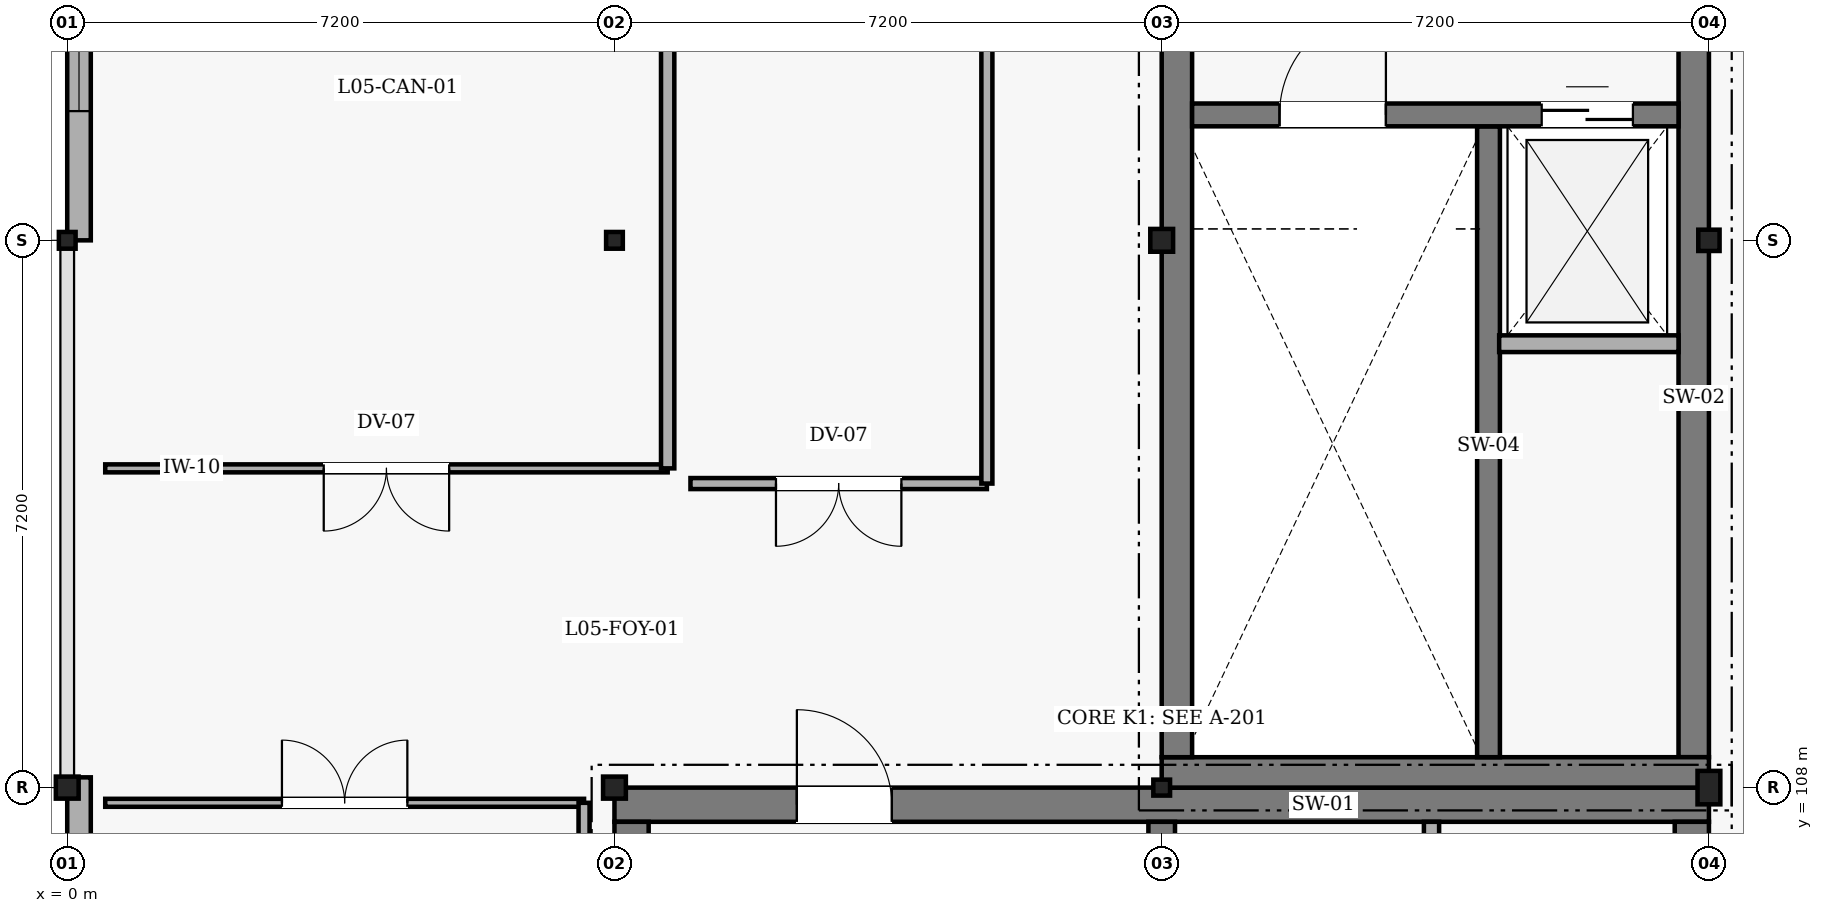
"""IFC4 building model, lengths in metres.
Left out: names, types, materials, properties, quantities, classifications, styles, units other than length and angle.
Written with IfcOpenShell. Run it as: python <this file> out.ifc"""

import sys

from ifc_helpers import new_model, si_unit, direction, frame, frame_2d, origin, origin_2d, place, context, subcontext, project, spatial, rectangle, i_section, extrude, element, fill, save


model = new_model("IFC4")
c1 = context("Model", 3, precision=1e-05, world=origin(), true_north=direction((0.0, 1.0)))
c2 = subcontext(c1, "Body", "Model", "MODEL_VIEW")
j1 = project(units=[si_unit("LENGTHUNIT", "METRE"), si_unit("PLANEANGLEUNIT", "RADIAN")], contexts=[c1])
p1 = place(None, origin())
s1 = spatial("IfcSite", under=j1, at=p1, CompositionType="ELEMENT")
p2 = place(p1, origin())
s2 = spatial("IfcBuilding", under=s1, at=p2, CompositionType="ELEMENT")
p3 = place(p2, frame((0.0, 0.0, 21.6)))
s3 = spatial("IfcBuildingStorey", under=s2, at=p3, CompositionType="ELEMENT", Elevation=21.6)
p4 = place(p3, frame((7.2, 107.775, 0.0), z_axis=(0.0, 0.0, 1.0), x_axis=(1.0, 0.0, 0.0)))
e1 = element("IfcWall", 1, at=p4, inside=s3, PredefinedType="SHEAR", context=c2, shape_type="SweptSolid", body=[
    extrude(rectangle(XDim=14.4, YDim=0.45, at=frame_2d((7.2, 0.0))), origin(), (0.0, 0.0, 1.0), 3.62),
])
p5 = place(p4, frame((2.4, 0.0, 0.0)))
e2 = element("IfcOpeningElement", 2, at=p5, cuts=e1, PredefinedType="OPENING", context=c2, shape_type="SweptSolid", body=[
    extrude(rectangle(XDim=1.25, YDim=2.2, at=frame_2d((0.625, 1.1))), frame((0.0, 0.235, 0.0), z_axis=(0.0, -1.0, 0.0), x_axis=(1.0, 0.0, 0.0)), (0.0, 0.0, 1.0), 0.47),
])
p6 = place(p3, frame((21.375, 107.55, 0.0), z_axis=(0.0, 0.0, 1.0), x_axis=(0.0, -1.0, 0.0)))
e3 = element("IfcWall", 3, at=p6, inside=s3, PredefinedType="SHEAR", context=c2, shape_type="SweptSolid", body=[
    extrude(rectangle(XDim=13.5, YDim=0.45, at=frame_2d((6.75, 0.0))), origin(), (0.0, 0.0, 1.0), 3.62),
])
p7 = place(p6, frame((9.8, 0.0, 0.0)))
e4 = element("IfcOpeningElement", 4, at=p7, cuts=e3, PredefinedType="OPENING", context=c2, shape_type="SweptSolid", body=[
    extrude(rectangle(XDim=1.0, YDim=2.15, at=frame_2d((0.5, 1.075))), frame((0.0, 0.235, 0.0), z_axis=(0.0, -1.0, 0.0), x_axis=(1.0, 0.0, 0.0)), (0.0, 0.0, 1.0), 0.47),
])
p8 = place(p6, frame((2.3, 0.0, 0.0)))
e5 = element("IfcOpeningElement", 5, at=p8, cuts=e3, PredefinedType="OPENING", context=c2, shape_type="SweptSolid", body=[
    extrude(rectangle(XDim=1.25, YDim=2.2, at=frame_2d((0.625, 1.1))), frame((0.0, 0.235, 0.0), z_axis=(0.0, -1.0, 0.0), x_axis=(1.0, 0.0, 0.0)), (0.0, 0.0, 1.0), 0.47),
])
p9 = place(p3, frame((7.425, 94.05, 0.0), z_axis=(0.0, 0.0, 1.0), x_axis=(0.0, 1.0, 0.0)))
e6 = element("IfcWall", 6, at=p9, inside=s3, PredefinedType="SHEAR", context=c2, shape_type="SweptSolid", body=[
    extrude(rectangle(XDim=13.5, YDim=0.45, at=frame_2d((6.75, 0.0))), origin(), (0.0, 0.0, 1.0), 3.62),
])
p10 = place(p3, frame((14.4, 107.55, 0.0), z_axis=(0.0, 0.0, 1.0), x_axis=(0.0, -1.0, 0.0)))
e7 = element("IfcWall", 7, at=p10, inside=s3, PredefinedType="SHEAR", context=c2, shape_type="SweptSolid", body=[
    extrude(rectangle(XDim=13.5, YDim=0.35, at=frame_2d((6.75, 0.0))), origin(), (0.0, 0.0, 1.0), 3.62),
])
p11 = place(p10, frame((1.4, 0.0, 0.0)))
e8 = element("IfcOpeningElement", 8, at=p11, cuts=e7, PredefinedType="OPENING", context=c2, shape_type="SweptSolid", body=[
    extrude(rectangle(XDim=1.25, YDim=2.2, at=frame_2d((0.625, 1.1))), frame((0.0, 0.185, 0.0), z_axis=(0.0, -1.0, 0.0), x_axis=(1.0, 0.0, 0.0)), (0.0, 0.0, 1.0), 0.37),
])
p12 = place(p3, frame((21.4, 122.0, 0.0), z_axis=(0.0, 0.0, 1.0), x_axis=(0.0, -1.0, 0.0)))
e9 = element("IfcWall", 9, at=p12, inside=s3, PredefinedType="SHEAR", context=c2, shape_type="SweptSolid", body=[
    extrude(rectangle(XDim=13.6, YDim=0.4, at=frame_2d((6.8, 0.0))), origin(), (0.0, 0.0, 1.0), 3.62),
])
p13 = place(p12, frame((2.3, 0.0, 0.0)))
e10 = element("IfcOpeningElement", 10, at=p13, cuts=e9, PredefinedType="OPENING", context=c2, shape_type="SweptSolid", body=[
    extrude(rectangle(XDim=1.25, YDim=2.2, at=frame_2d((0.625, 1.1))), frame((0.0, 0.21, 0.0), z_axis=(0.0, -1.0, 0.0), x_axis=(1.0, 0.0, 0.0)), (0.0, 0.0, 1.0), 0.42),
])
p14 = place(p3, frame((21.6, 108.2, 0.0), z_axis=(0.0, 0.0, 1.0), x_axis=(-1.0, 0.0, 0.0)))
e11 = element("IfcWall", 11, at=p14, inside=s3, PredefinedType="SHEAR", context=c2, shape_type="SweptSolid", body=[
    extrude(rectangle(XDim=7.2, YDim=0.4, at=frame_2d((3.6, 0.0))), origin(), (0.0, 0.0, 1.0), 3.62),
])
p15 = place(p3, frame((14.6, 108.4, 0.0), z_axis=(0.0, 0.0, 1.0), x_axis=(0.0, 1.0, 0.0)))
e12 = element("IfcWall", 12, at=p15, inside=s3, PredefinedType="SHEAR", context=c2, shape_type="SweptSolid", body=[
    extrude(rectangle(XDim=13.6, YDim=0.4, at=frame_2d((6.8, 0.0))), origin(), (0.0, 0.0, 1.0), 3.62),
])
p16 = place(p15, frame((9.8, 0.0, 0.0)))
e13 = element("IfcOpeningElement", 13, at=p16, cuts=e12, PredefinedType="OPENING", context=c2, shape_type="SweptSolid", body=[
    extrude(rectangle(XDim=1.25, YDim=2.2, at=frame_2d((0.625, 1.1))), frame((0.0, 0.21, 0.0), z_axis=(0.0, -1.0, 0.0), x_axis=(1.0, 0.0, 0.0)), (0.0, 0.0, 1.0), 0.42),
])
p17 = place(p3, frame((18.7, 116.7, 0.0), z_axis=(0.0, 0.0, 1.0), x_axis=(0.0, -1.0, 0.0)))
e14 = element("IfcWall", 14, at=p17, inside=s3, PredefinedType="SHEAR", context=c2, shape_type="SweptSolid", body=[
    extrude(rectangle(XDim=8.3, YDim=0.3, at=frame_2d((4.15, 0.0))), origin(), (0.0, 0.0, 1.0), 3.62),
])
p18 = place(p3, frame((14.8, 116.85, 0.0), z_axis=(0.0, 0.0, 1.0), x_axis=(1.0, 0.0, 0.0)))
e15 = element("IfcWall", 15, at=p18, inside=s3, PredefinedType="SHEAR", context=c2, shape_type="SweptSolid", body=[
    extrude(rectangle(XDim=6.4, YDim=0.3, at=frame_2d((3.2, 0.0))), origin(), (0.0, 0.0, 1.0), 3.62),
])
p19 = place(p18, frame((1.15, 0.0, 0.0)))
e16 = element("IfcOpeningElement", 16, at=p19, cuts=e15, PredefinedType="OPENING", context=c2, shape_type="SweptSolid", body=[
    extrude(rectangle(XDim=1.4, YDim=2.2, at=frame_2d((0.7, 1.1))), frame((0.0, 0.16, 0.0), z_axis=(0.0, -1.0, 0.0), x_axis=(1.0, 0.0, 0.0)), (0.0, 0.0, 1.0), 0.32),
])
p20 = place(p18, frame((4.6, 0.0, 0.0)))
e17 = element("IfcOpeningElement", 17, at=p20, cuts=e15, PredefinedType="OPENING", context=c2, shape_type="SweptSolid", body=[
    extrude(rectangle(XDim=1.2, YDim=2.15, at=frame_2d((0.6, 1.075))), frame((0.0, 0.16, 0.0), z_axis=(0.0, -1.0, 0.0), x_axis=(1.0, 0.0, 0.0)), (0.0, 0.0, 1.0), 0.32),
])
p21 = place(p3, frame((0.0, 108.0, 0.0), z_axis=(0.0, 0.0, 1.0), x_axis=(1.0, 0.0, 0.0)))
e18 = element("IfcColumn", 18, at=p21, inside=s3, PredefinedType="COLUMN", context=c2, shape_type="SweptSolid", body=[
    extrude(i_section(OverallWidth=0.3, OverallDepth=0.29, WebThickness=0.009, FlangeThickness=0.014, FilletRadius=0.027, at=origin_2d()), origin(), (0.0, 0.0, 1.0), 3.62),
])
p22 = place(p3, frame((0.0, 115.2, 0.0), z_axis=(0.0, 0.0, 1.0), x_axis=(1.0, 0.0, 0.0)))
e19 = element("IfcColumn", 19, at=p22, inside=s3, PredefinedType="COLUMN", context=c2, shape_type="SweptSolid", body=[
    extrude(i_section(OverallWidth=0.22, OverallDepth=0.22, WebThickness=0.01, FlangeThickness=0.016, FilletRadius=0.018, at=origin_2d()), origin(), (0.0, 0.0, 1.0), 3.62),
])
p23 = place(p3, frame((7.2, 108.0, 0.0), z_axis=(0.0, 0.0, 1.0), x_axis=(1.0, 0.0, 0.0)))
e20 = element("IfcColumn", 20, at=p23, inside=s3, PredefinedType="COLUMN", context=c2, shape_type="SweptSolid", body=[
    extrude(i_section(OverallWidth=0.3, OverallDepth=0.29, WebThickness=0.009, FlangeThickness=0.014, FilletRadius=0.027, at=origin_2d()), origin(), (0.0, 0.0, 1.0), 3.62),
])
p24 = place(p3, frame((7.2, 115.2, 0.0), z_axis=(0.0, 0.0, 1.0), x_axis=(1.0, 0.0, 0.0)))
e21 = element("IfcColumn", 21, at=p24, inside=s3, PredefinedType="COLUMN", context=c2, shape_type="SweptSolid", body=[
    extrude(i_section(OverallWidth=0.22, OverallDepth=0.22, WebThickness=0.01, FlangeThickness=0.016, FilletRadius=0.018, at=origin_2d()), origin(), (0.0, 0.0, 1.0), 3.62),
])
p25 = place(p3, frame((14.4, 108.0, 0.0), z_axis=(0.0, 0.0, 1.0), x_axis=(1.0, 0.0, 0.0)))
e22 = element("IfcColumn", 22, at=p25, inside=s3, PredefinedType="COLUMN", context=c2, shape_type="SweptSolid", body=[
    extrude(i_section(OverallWidth=0.22, OverallDepth=0.21, WebThickness=0.007, FlangeThickness=0.011, FilletRadius=0.018, at=origin_2d()), origin(), (0.0, 0.0, 1.0), 3.62),
])
p26 = place(p3, frame((14.4, 115.2, 0.0), z_axis=(0.0, 0.0, 1.0), x_axis=(1.0, 0.0, 0.0)))
e23 = element("IfcColumn", 23, at=p26, inside=s3, PredefinedType="COLUMN", context=c2, shape_type="SweptSolid", body=[
    extrude(i_section(OverallWidth=0.3, OverallDepth=0.3, WebThickness=0.011, FlangeThickness=0.019, FilletRadius=0.027, at=origin_2d()), origin(), (0.0, 0.0, 1.0), 3.62),
])
p27 = place(p3, frame((21.6, 108.0, 0.0), z_axis=(0.0, 0.0, 1.0), x_axis=(1.0, 0.0, 0.0)))
e24 = element("IfcColumn", 24, at=p27, inside=s3, PredefinedType="COLUMN", context=c2, shape_type="SweptSolid", body=[
    extrude(i_section(OverallWidth=0.3, OverallDepth=0.44, WebThickness=0.011, FlangeThickness=0.021, FilletRadius=0.027, at=origin_2d()), origin(), (0.0, 0.0, 1.0), 3.62),
])
p28 = place(p3, frame((21.6, 115.2, 0.0), z_axis=(0.0, 0.0, 1.0), x_axis=(1.0, 0.0, 0.0)))
e25 = element("IfcColumn", 25, at=p28, inside=s3, PredefinedType="COLUMN", context=c2, shape_type="SweptSolid", body=[
    extrude(i_section(OverallWidth=0.28, OverallDepth=0.28, WebThickness=0.01, FlangeThickness=0.018, FilletRadius=0.024, at=origin_2d()), origin(), (0.0, 0.0, 1.0), 3.62),
])
p29 = place(p3, frame((0.155, 100.8, 0.0), z_axis=(0.0, 0.0, 1.0), x_axis=(0.0, 1.0, 0.0)))
e26 = element("IfcWall", 26, at=p29, inside=s3, PredefinedType="SOLIDWALL", context=c2, shape_type="SweptSolid", body=[
    extrude(rectangle(XDim=7.335, YDim=0.31, at=frame_2d((3.667, 0.0))), origin(), (0.0, 0.0, 1.0), 3.32),
])
p30 = place(p29, frame((1.85, 0.0, 0.9)))
e27 = element("IfcOpeningElement", 27, at=p30, cuts=e26, PredefinedType="OPENING", context=c2, shape_type="SweptSolid", body=[
    extrude(rectangle(XDim=3.5, YDim=1.8, at=frame_2d((1.75, 0.9))), frame((0.0, 0.165, 0.0), z_axis=(0.0, -1.0, 0.0), x_axis=(1.0, 0.0, 0.0)), (0.0, 0.0, 1.0), 0.33),
])
p31 = place(p3, frame((0.155, 115.2, 0.0), z_axis=(0.0, 0.0, 1.0), x_axis=(0.0, 1.0, 0.0)))
e28 = element("IfcWall", 28, at=p31, inside=s3, PredefinedType="SOLIDWALL", context=c2, shape_type="SweptSolid", body=[
    extrude(rectangle(XDim=7.2, YDim=0.31, at=frame_2d((3.6, 0.0))), origin(), (0.0, 0.0, 1.0), 3.32),
])
p32 = place(p31, frame((1.7, 0.0, 0.9)))
e29 = element("IfcOpeningElement", 29, at=p32, cuts=e28, PredefinedType="OPENING", context=c2, shape_type="SweptSolid", body=[
    extrude(rectangle(XDim=3.8, YDim=1.85, at=frame_2d((1.9, 0.925))), frame((0.0, 0.165, 0.0), z_axis=(0.0, -1.0, 0.0), x_axis=(1.0, 0.0, 0.0)), (0.0, 0.0, 1.0), 0.33),
])
p33 = place(p3, frame((17.95, 102.56, 0.0), z_axis=(0.0, 0.0, 1.0), x_axis=(0.0, 1.0, 0.0)))
e30 = element("IfcWall", 30, at=p33, inside=s3, PredefinedType="PARTITIONING", context=c2, shape_type="SweptSolid", body=[
    extrude(rectangle(XDim=4.99, YDim=0.2, at=frame_2d((2.495, 0.0))), origin(), (0.0, 0.0, 1.0), 3.55),
])
p34 = place(p33, frame((1.6, 0.0, 0.0)))
e31 = element("IfcOpeningElement", 31, at=p34, cuts=e30, PredefinedType="OPENING", context=c2, shape_type="SweptSolid", body=[
    extrude(rectangle(XDim=1.25, YDim=2.2, at=frame_2d((0.625, 1.1))), frame((0.0, 0.11, 0.0), z_axis=(0.0, -1.0, 0.0), x_axis=(1.0, 0.0, 0.0)), (0.0, 0.0, 1.0), 0.22),
])
p35 = place(p3, frame((18.84, 113.84, 0.0), z_axis=(0.0, 0.0, 1.0), x_axis=(1.0, 0.0, 0.0)))
e32 = element("IfcWall", 32, at=p35, inside=s3, PredefinedType="PARTITIONING", context=c2, shape_type="SweptSolid", body=[
    extrude(rectangle(XDim=2.36, YDim=0.22, at=frame_2d((1.18, 0.0))), origin(), (0.0, 0.0, 1.0), 3.55),
])
p36 = place(p3, frame((0.5, 107.8, 0.0), z_axis=(0.0, 0.0, 1.0), x_axis=(1.0, 0.0, 0.0)))
e33 = element("IfcWall", 33, at=p36, inside=s3, PredefinedType="PARTITIONING", context=c2, shape_type="SweptSolid", body=[
    extrude(rectangle(XDim=6.3, YDim=0.105, at=frame_2d((3.15, 0.0))), origin(), (0.0, 0.0, 1.0), 3.17),
])
p37 = place(p36, frame((2.325, 0.0, 0.0)))
e34 = element("IfcOpeningElement", 34, at=p37, cuts=e33, PredefinedType="OPENING", context=c2, shape_type="SweptSolid", body=[
    extrude(rectangle(XDim=1.65, YDim=2.25, at=frame_2d((0.825, 1.125))), frame((0.0, 0.062, 0.0), z_axis=(0.0, -1.0, 0.0), x_axis=(1.0, 0.0, 0.0)), (0.0, 0.0, 1.0), 0.125),
])
p38 = place(p3, frame((6.8, 107.8, 0.0), z_axis=(0.0, 0.0, 1.0), x_axis=(0.0, -1.0, 0.0)))
e35 = element("IfcWall", 35, at=p38, inside=s3, PredefinedType="PARTITIONING", context=c2, shape_type="SweptSolid", body=[
    extrude(rectangle(XDim=13.7, YDim=0.145, at=frame_2d((6.85, 0.0))), origin(), (0.0, 0.0, 1.0), 3.17),
])
p39 = place(p3, frame((7.9, 112.2, 0.0), z_axis=(0.0, 0.0, 1.0), x_axis=(-1.0, 0.0, 0.0)))
e36 = element("IfcWall", 36, at=p39, inside=s3, PredefinedType="PARTITIONING", context=c2, shape_type="SweptSolid", body=[
    extrude(rectangle(XDim=7.4, YDim=0.105, at=frame_2d((3.7, 0.0))), origin(), (0.0, 0.0, 1.0), 3.22),
])
p40 = place(p39, frame((2.875, 0.0, 0.0)))
e37 = element("IfcOpeningElement", 37, at=p40, cuts=e36, PredefinedType="OPENING", context=c2, shape_type="SweptSolid", body=[
    extrude(rectangle(XDim=1.65, YDim=2.25, at=frame_2d((0.825, 1.125))), frame((0.0, 0.062, 0.0), z_axis=(0.0, -1.0, 0.0), x_axis=(1.0, 0.0, 0.0)), (0.0, 0.0, 1.0), 0.125),
])
p41 = place(p3, frame((7.9, 121.9, 0.0), z_axis=(0.0, 0.0, 1.0), x_axis=(0.0, -1.0, 0.0)))
e38 = element("IfcWall", 38, at=p41, inside=s3, PredefinedType="PARTITIONING", context=c2, shape_type="SweptSolid", body=[
    extrude(rectangle(XDim=9.7, YDim=0.175, at=frame_2d((4.85, 0.0))), origin(), (0.0, 0.0, 1.0), 3.17),
])
p42 = place(p3, frame((12.1, 112.0, 0.0), z_axis=(0.0, 0.0, 1.0), x_axis=(-1.0, 0.0, 0.0)))
e39 = element("IfcWall", 39, at=p42, inside=s3, PredefinedType="PARTITIONING", context=c2, shape_type="SweptSolid", body=[
    extrude(rectangle(XDim=3.9, YDim=0.145, at=frame_2d((1.95, 0.0))), origin(), (0.0, 0.0, 1.0), 3.55),
])
p43 = place(p42, frame((1.125, 0.0, 0.0)))
e40 = element("IfcOpeningElement", 40, at=p43, cuts=e39, PredefinedType="OPENING", context=c2, shape_type="SweptSolid", body=[
    extrude(rectangle(XDim=1.65, YDim=2.25, at=frame_2d((0.825, 1.125))), frame((0.0, 0.083, 0.0), z_axis=(0.0, -1.0, 0.0), x_axis=(1.0, 0.0, 0.0)), (0.0, 0.0, 1.0), 0.165),
])
p44 = place(p3, frame((12.1, 122.0, 0.0), z_axis=(0.0, 0.0, 1.0), x_axis=(0.0, -1.0, 0.0)))
e41 = element("IfcWall", 41, at=p44, inside=s3, PredefinedType="PARTITIONING", context=c2, shape_type="SweptSolid", body=[
    extrude(rectangle(XDim=10.0, YDim=0.145, at=frame_2d((5.0, 0.0))), origin(), (0.0, 0.0, 1.0), 3.17),
])
p45 = place(p32, origin())
e42 = element("IfcWindow", 42, at=p45, inside=s3, PartitioningType="SINGLE_PANEL", PredefinedType="WINDOW", context=c2, shape_type="SweptSolid", body=[
    extrude(rectangle(XDim=3.8, YDim=1.85, at=frame_2d((1.9, 0.925))), frame((0.0, 0.03, 0.0), z_axis=(0.0, -1.0, 0.0), x_axis=(1.0, 0.0, 0.0)), (0.0, 0.0, 1.0), 0.06),
])
fill(e29, e42)
p46 = place(p5, origin())
e43 = element("IfcDoor", 43, at=p46, inside=s3, OperationType="SINGLE_SWING_LEFT", PredefinedType="DOOR", context=c2, shape_type="SweptSolid", body=[
    extrude(rectangle(XDim=1.25, YDim=2.2, at=frame_2d((0.625, 1.1))), frame((0.0, 0.025, 0.0), z_axis=(0.0, -1.0, 0.0), x_axis=(1.0, 0.0, 0.0)), (0.0, 0.0, 1.0), 0.05),
])
fill(e2, e43)
p47 = place(p19, origin())
e44 = element("IfcDoor", 44, at=p47, inside=s3, OperationType="SINGLE_SWING_RIGHT", PredefinedType="DOOR", context=c2, shape_type="SweptSolid", body=[
    extrude(rectangle(XDim=1.4, YDim=2.2, at=frame_2d((0.7, 1.1))), frame((0.0, 0.025, 0.0), z_axis=(0.0, -1.0, 0.0), x_axis=(1.0, 0.0, 0.0)), (0.0, 0.0, 1.0), 0.05),
])
fill(e16, e44)
p48 = place(p20, origin())
e45 = element("IfcDoor", 45, at=p48, inside=s3, OperationType="DOUBLE_DOOR_SLIDING", PredefinedType="DOOR", context=c2, shape_type="SweptSolid", body=[
    extrude(rectangle(XDim=1.2, YDim=2.15, at=frame_2d((0.6, 1.075))), frame((0.0, 0.025, 0.0), z_axis=(0.0, -1.0, 0.0), x_axis=(1.0, 0.0, 0.0)), (0.0, 0.0, 1.0), 0.05),
])
fill(e17, e45)
p49 = place(p37, origin())
e46 = element("IfcDoor", 46, at=p49, inside=s3, OperationType="DOUBLE_DOOR_SINGLE_SWING", PredefinedType="DOOR", context=c2, shape_type="SweptSolid", body=[
    extrude(rectangle(XDim=1.65, YDim=2.25, at=frame_2d((0.825, 1.125))), frame((0.0, 0.025, 0.0), z_axis=(0.0, -1.0, 0.0), x_axis=(1.0, 0.0, 0.0)), (0.0, 0.0, 1.0), 0.05),
])
fill(e34, e46)
p50 = place(p40, origin())
e47 = element("IfcDoor", 47, at=p50, inside=s3, OperationType="DOUBLE_DOOR_SINGLE_SWING", PredefinedType="DOOR", context=c2, shape_type="SweptSolid", body=[
    extrude(rectangle(XDim=1.65, YDim=2.25, at=frame_2d((0.825, 1.125))), frame((0.0, 0.025, 0.0), z_axis=(0.0, -1.0, 0.0), x_axis=(1.0, 0.0, 0.0)), (0.0, 0.0, 1.0), 0.05),
])
fill(e37, e47)
p51 = place(p43, origin())
e48 = element("IfcDoor", 48, at=p51, inside=s3, OperationType="DOUBLE_DOOR_SINGLE_SWING", PredefinedType="DOOR", context=c2, shape_type="SweptSolid", body=[
    extrude(rectangle(XDim=1.65, YDim=2.25, at=frame_2d((0.825, 1.125))), frame((0.0, 0.025, 0.0), z_axis=(0.0, -1.0, 0.0), x_axis=(1.0, 0.0, 0.0)), (0.0, 0.0, 1.0), 0.05),
])
fill(e40, e48)
save(model, sys.argv[1])
